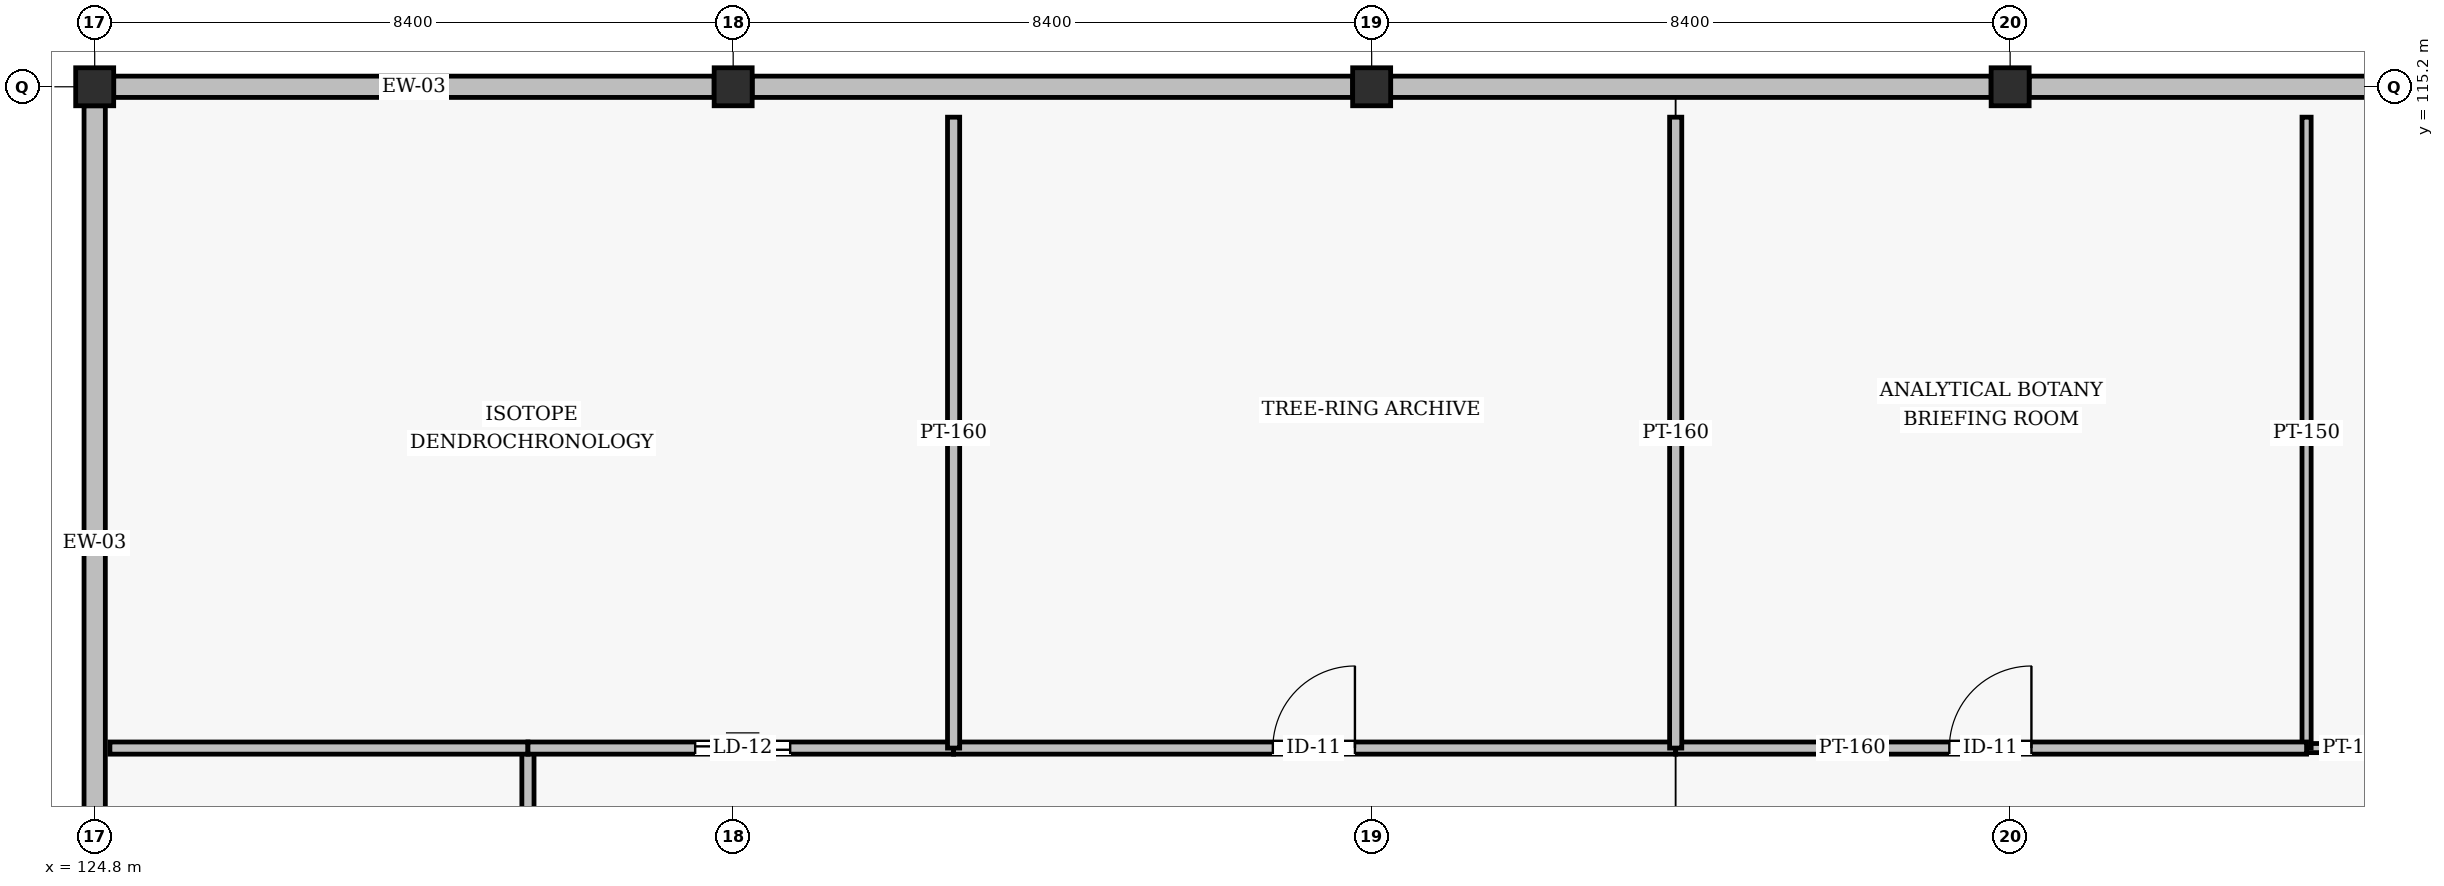
"""IFC4 building model, lengths in metres.
Left out: names, types, materials, properties, quantities, classifications, styles, units other than length and angle.
Written with IfcOpenShell. Run it as: python <this file> out.ifc"""

import sys

from ifc_helpers import new_model, si_unit, direction, frame, frame_2d, origin, origin_2d, place, context, subcontext, project, spatial, rectangle, hollow_rectangle, extrude, element, fill, save


model = new_model("IFC4")
c1 = context("Model", 3, precision=1e-05, world=origin(), true_north=direction((0.0, 1.0)))
c2 = subcontext(c1, "Body", "Model", "MODEL_VIEW")
j1 = project(units=[si_unit("LENGTHUNIT", "METRE"), si_unit("PLANEANGLEUNIT", "RADIAN")], contexts=[c1])
p1 = place(None, origin())
s1 = spatial("IfcSite", under=j1, at=p1, CompositionType="ELEMENT")
p2 = place(p1, origin())
s2 = spatial("IfcBuilding", under=s1, at=p2, CompositionType="ELEMENT")
p3 = place(p2, frame((0.0, 0.0, 39.6)))
s3 = spatial("IfcBuildingStorey", under=s2, at=p3, CompositionType="ELEMENT", Elevation=39.6)
for number, where, z_axis, x_axis in (
    (1, (124.8, 115.2, 0.0), (0.0, 0.0, 1.0), (1.0, 0.0, 0.0)),
    (2, (133.2, 115.2, 0.0), (0.0, 0.0, 1.0), (1.0, 0.0, 0.0)),
    (3, (141.6, 115.2, 0.0), (0.0, 0.0, 1.0), (1.0, 0.0, 0.0)),
    (4, (150.0, 115.2, 0.0), (0.0, 0.0, 1.0), (1.0, 0.0, 0.0)),
):
    element("IfcColumn", number, at=place(p3, frame(where, z_axis=z_axis, x_axis=x_axis)), inside=s3, PredefinedType="COLUMN", context=c2, shape_type="SweptSolid", body=[
        extrude(hollow_rectangle(XDim=0.5, YDim=0.5, WallThickness=0.02, InnerFilletRadius=0.02, OuterFilletRadius=0.04, at=origin_2d()), origin(), (0.0, 0.0, 1.0), 3.6),
    ])
p4 = place(p3, frame((158.75, 115.2, 0.0), z_axis=(0.0, 0.0, 1.0), x_axis=(-1.0, 0.0, 0.0)))
e5 = element("IfcWall", 5, at=p4, inside=s3, PredefinedType="SOLIDWALL", context=c2, shape_type="SweptSolid", body=[
    extrude(rectangle(XDim=8.5, YDim=0.28, at=frame_2d((4.25, 0.0))), origin(), (0.0, 0.0, 1.0), 2.55),
])
p5 = place(p3, frame((149.75, 115.2, 0.0), z_axis=(0.0, 0.0, 1.0), x_axis=(-1.0, 0.0, 0.0)))
e6 = element("IfcWall", 6, at=p5, inside=s3, PredefinedType="SOLIDWALL", context=c2, shape_type="SweptSolid", body=[
    extrude(rectangle(XDim=7.9, YDim=0.28, at=frame_2d((3.95, 0.0))), origin(), (0.0, 0.0, 1.0), 2.842),
])
p6 = place(p3, frame((141.35, 115.2, 0.0), z_axis=(0.0, 0.0, 1.0), x_axis=(-1.0, 0.0, 0.0)))
e7 = element("IfcWall", 7, at=p6, inside=s3, PredefinedType="SOLIDWALL", context=c2, shape_type="SweptSolid", body=[
    extrude(rectangle(XDim=7.9, YDim=0.28, at=frame_2d((3.95, 0.0))), origin(), (0.0, 0.0, 1.0), 2.842),
])
p7 = place(p3, frame((132.95, 115.2, 0.0), z_axis=(0.0, 0.0, 1.0), x_axis=(-1.0, 0.0, 0.0)))
e8 = element("IfcWall", 8, at=p7, inside=s3, PredefinedType="SOLIDWALL", context=c2, shape_type="SweptSolid", body=[
    extrude(rectangle(XDim=7.9, YDim=0.28, at=frame_2d((3.95, 0.0))), origin(), (0.0, 0.0, 1.0), 2.842),
])
p8 = place(p3, frame((124.8, 114.95, 0.0), z_axis=(0.0, 0.0, 1.0), x_axis=(0.0, -1.0, 0.0)))
e9 = element("IfcWall", 9, at=p8, inside=s3, PredefinedType="SOLIDWALL", context=c2, shape_type="SweptSolid", body=[
    extrude(rectangle(XDim=11.5, YDim=0.28, at=frame_2d((5.75, 0.0))), origin(), (0.0, 0.0, 1.0), 2.55),
])
p9 = place(p3, frame((153.9, 106.5, 0.0), z_axis=(0.0, 0.0, 1.0), x_axis=(1.0, 0.0, 0.0)))
e10 = element("IfcWall", 10, at=p9, inside=s3, PredefinedType="PARTITIONING", context=c2, shape_type="SweptSolid", body=[
    extrude(rectangle(XDim=3.6, YDim=0.12, at=frame_2d((1.8, 0.0))), origin(), (0.0, 0.0, 1.0), 3.342),
])
p10 = place(p9, frame((1.35, 0.0, 0.0)))
e11 = element("IfcOpeningElement", 11, at=p10, cuts=e10, PredefinedType="OPENING", context=c2, shape_type="SweptSolid", body=[
    extrude(rectangle(XDim=0.9, YDim=2.1, at=frame_2d((0.45, 1.05))), frame((0.0, 0.07, 0.0), z_axis=(0.0, -1.0, 0.0), x_axis=(1.0, 0.0, 0.0)), (0.0, 0.0, 1.0), 0.14),
])
p11 = place(p3, frame((153.9, 106.5, 0.0), z_axis=(0.0, 0.0, 1.0), x_axis=(0.0, 1.0, 0.0)))
e12 = element("IfcWall", 12, at=p11, inside=s3, PredefinedType="PARTITIONING", context=c2, shape_type="SweptSolid", body=[
    extrude(rectangle(XDim=8.3, YDim=0.12, at=frame_2d((4.15, 0.0))), origin(), (0.0, 0.0, 1.0), 2.942),
])
p12 = place(p3, frame((130.5, 99.5, 0.0), z_axis=(0.0, 0.0, 1.0), x_axis=(0.0, 1.0, 0.0)))
e13 = element("IfcWall", 13, at=p12, inside=s3, PredefinedType="PARTITIONING", context=c2, shape_type="SweptSolid", body=[
    extrude(rectangle(XDim=7.0, YDim=0.16, at=frame_2d((3.5, 0.0))), origin(), (0.0, 0.0, 1.0), 2.842),
])
p13 = place(p12, frame((2.95, 0.0, 0.0)))
e14 = element("IfcOpeningElement", 14, at=p13, cuts=e13, PredefinedType="OPENING", context=c2, shape_type="SweptSolid", body=[
    extrude(rectangle(XDim=1.14, YDim=2.12, at=frame_2d((0.57, 1.06))), frame((0.0, 0.09, 0.0), z_axis=(0.0, -1.0, 0.0), x_axis=(1.0, 0.0, 0.0)), (0.0, 0.0, 1.0), 0.18),
])
p14 = place(p3, frame((125.0, 106.5, 0.0), z_axis=(0.0, 0.0, 1.0), x_axis=(1.0, 0.0, 0.0)))
e15 = element("IfcWall", 15, at=p14, inside=s3, PredefinedType="PARTITIONING", context=c2, shape_type="SweptSolid", body=[
    extrude(rectangle(XDim=5.5, YDim=0.16, at=frame_2d((2.75, 0.0))), origin(), (0.0, 0.0, 1.0), 3.342),
])
p15 = place(p3, frame((130.5, 106.5, 0.0), z_axis=(0.0, 0.0, 1.0), x_axis=(1.0, 0.0, 0.0)))
e16 = element("IfcWall", 16, at=p15, inside=s3, PredefinedType="PARTITIONING", context=c2, shape_type="SweptSolid", body=[
    extrude(rectangle(XDim=5.6, YDim=0.16, at=frame_2d((2.8, 0.0))), origin(), (0.0, 0.0, 1.0), 2.592),
])
p16 = place(p15, frame((2.2, 0.0, 0.0)))
e17 = element("IfcOpeningElement", 17, at=p16, cuts=e16, PredefinedType="OPENING", context=c2, shape_type="SweptSolid", body=[
    extrude(rectangle(XDim=1.25, YDim=2.12, at=frame_2d((0.625, 1.06))), frame((0.0, 0.09, 0.0), z_axis=(0.0, -1.0, 0.0), x_axis=(1.0, 0.0, 0.0)), (0.0, 0.0, 1.0), 0.18),
])
p17 = place(p3, frame((136.1, 106.5, 0.0), z_axis=(0.0, 0.0, 1.0), x_axis=(1.0, 0.0, 0.0)))
e18 = element("IfcWall", 18, at=p17, inside=s3, PredefinedType="PARTITIONING", context=c2, shape_type="SweptSolid", body=[
    extrude(rectangle(XDim=9.5, YDim=0.16, at=frame_2d((4.75, 0.0))), origin(), (0.0, 0.0, 1.0), 2.592),
])
p18 = place(p17, frame((4.2, 0.0, 0.0)))
e19 = element("IfcOpeningElement", 19, at=p18, cuts=e18, PredefinedType="OPENING", context=c2, shape_type="SweptSolid", body=[
    extrude(rectangle(XDim=1.08, YDim=2.08, at=frame_2d((0.54, 1.04))), frame((0.0, 0.09, 0.0), z_axis=(0.0, -1.0, 0.0), x_axis=(1.0, 0.0, 0.0)), (0.0, 0.0, 1.0), 0.18),
])
p19 = place(p3, frame((145.6, 106.5, 0.0), z_axis=(0.0, 0.0, 1.0), x_axis=(1.0, 0.0, 0.0)))
e20 = element("IfcWall", 20, at=p19, inside=s3, PredefinedType="PARTITIONING", context=c2, shape_type="SweptSolid", body=[
    extrude(rectangle(XDim=8.3, YDim=0.16, at=frame_2d((4.15, 0.0))), origin(), (0.0, 0.0, 1.0), 2.592),
])
p20 = place(p19, frame((3.6, 0.0, 0.0)))
e21 = element("IfcOpeningElement", 21, at=p20, cuts=e20, PredefinedType="OPENING", context=c2, shape_type="SweptSolid", body=[
    extrude(rectangle(XDim=1.08, YDim=2.08, at=frame_2d((0.54, 1.04))), frame((0.0, 0.09, 0.0), z_axis=(0.0, -1.0, 0.0), x_axis=(1.0, 0.0, 0.0)), (0.0, 0.0, 1.0), 0.18),
])
for number, where, z_axis, x_axis in (
    (22, (136.1, 106.5, 0.0), (0.0, 0.0, 1.0), (0.0, 1.0, 0.0)),
    (23, (145.6, 106.5, 0.0), (0.0, 0.0, 1.0), (0.0, 1.0, 0.0)),
):
    element("IfcWall", number, at=place(p3, frame(where, z_axis=z_axis, x_axis=x_axis)), inside=s3, PredefinedType="PARTITIONING", context=c2, shape_type="SweptSolid", body=[
        extrude(rectangle(XDim=8.3, YDim=0.16, at=frame_2d((4.15, 0.0))), origin(), (0.0, 0.0, 1.0), 2.992),
    ])
p21 = place(p16, origin())
e24 = element("IfcDoor", 24, at=p21, inside=s3, OperationType="SINGLE_SWING_LEFT", PredefinedType="DOOR", context=c2, shape_type="SweptSolid", body=[
    extrude(rectangle(XDim=1.25, YDim=2.12, at=frame_2d((0.625, 1.06))), frame((0.0, 0.025, 0.0), z_axis=(0.0, -1.0, 0.0), x_axis=(1.0, 0.0, 0.0)), (0.0, 0.0, 1.0), 0.05),
])
fill(e17, e24)
p22 = place(p18, origin())
e25 = element("IfcDoor", 25, at=p22, inside=s3, OperationType="SINGLE_SWING_RIGHT", PredefinedType="DOOR", context=c2, shape_type="SweptSolid", body=[
    extrude(rectangle(XDim=1.08, YDim=2.08, at=frame_2d((0.54, 1.04))), frame((0.0, 0.025, 0.0), z_axis=(0.0, -1.0, 0.0), x_axis=(1.0, 0.0, 0.0)), (0.0, 0.0, 1.0), 0.05),
])
fill(e19, e25)
p23 = place(p20, origin())
e26 = element("IfcDoor", 26, at=p23, inside=s3, OperationType="SINGLE_SWING_RIGHT", PredefinedType="DOOR", context=c2, shape_type="SweptSolid", body=[
    extrude(rectangle(XDim=1.08, YDim=2.08, at=frame_2d((0.54, 1.04))), frame((0.0, 0.025, 0.0), z_axis=(0.0, -1.0, 0.0), x_axis=(1.0, 0.0, 0.0)), (0.0, 0.0, 1.0), 0.05),
])
fill(e21, e26)
save(model, sys.argv[1])
